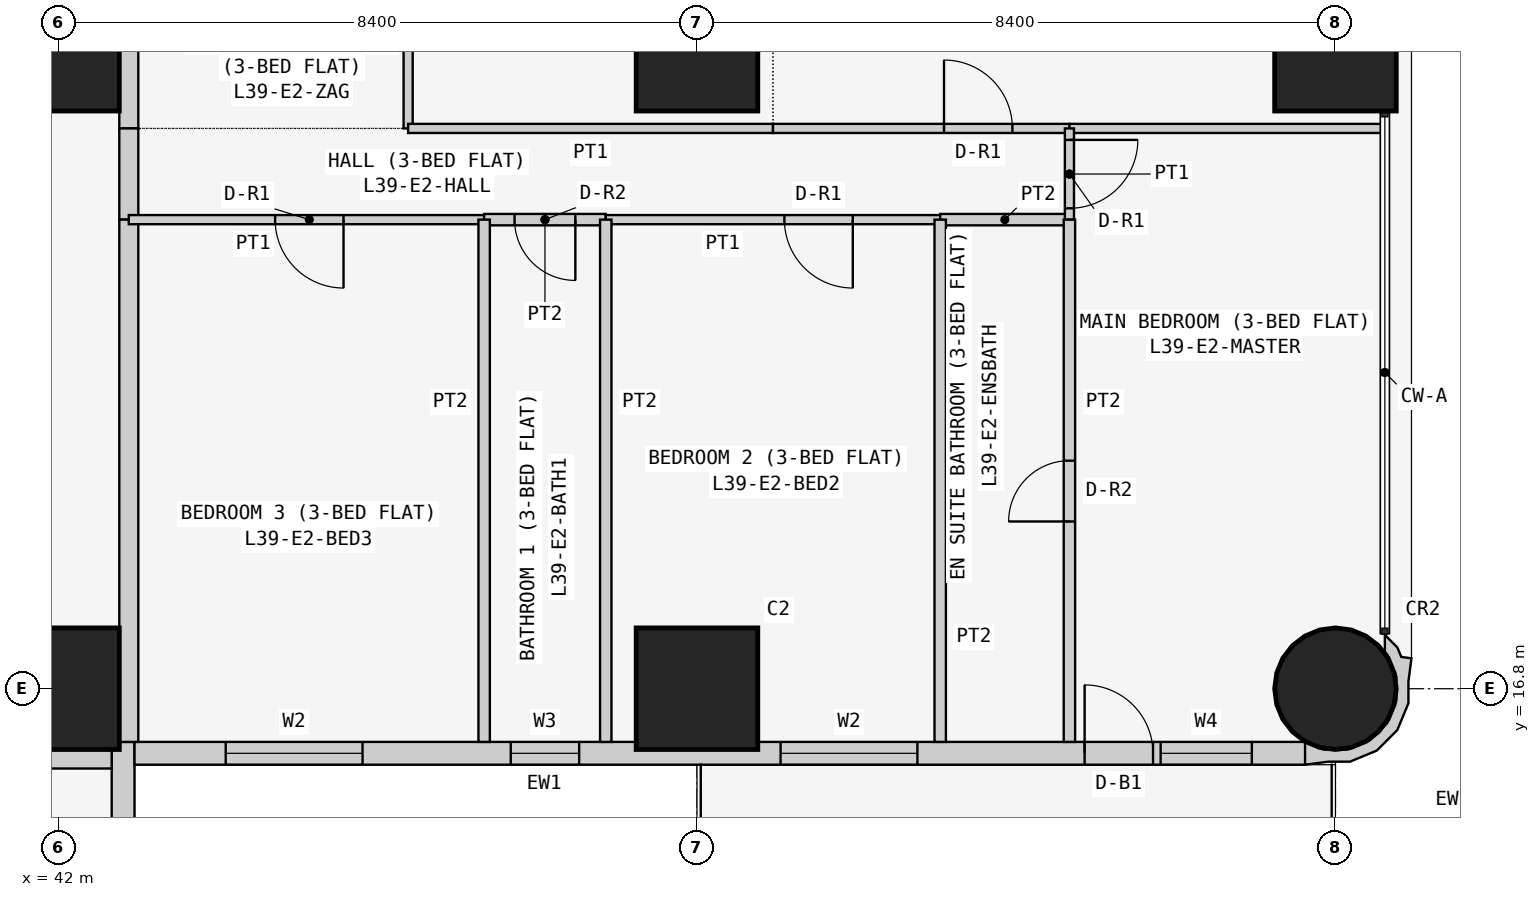
"""IFC4 building model, lengths in metres.
Left out: names, types, materials, properties, quantities, classifications, styles, units other than length and angle.
Written with IfcOpenShell. Run it as: python <this file> out.ifc"""

import sys

from ifc_helpers import new_model, si_unit, direction, frame, frame_2d, origin, origin_2d, place, context, subcontext, project, spatial, polyline, rectangle, circle, outline, extrude, element, fill, save


model = new_model("IFC4")
c1 = context("Model", 3, precision=1e-05, world=origin(), true_north=direction((0.0, 1.0)))
c2 = subcontext(c1, "Body", "Model", "MODEL_VIEW")
j1 = project(units=[si_unit("LENGTHUNIT", "METRE"), si_unit("PLANEANGLEUNIT", "RADIAN")], contexts=[c1])
p1 = place(None, origin())
s1 = spatial("IfcSite", under=j1, at=p1, CompositionType="ELEMENT")
p2 = place(p1, origin())
s2 = spatial("IfcBuilding", under=s1, at=p2, CompositionType="ELEMENT")
p3 = place(p2, frame((0.0, 0.0, 152.1)))
s3 = spatial("IfcBuildingStorey", under=s2, at=p3, CompositionType="ELEMENT", Elevation=152.1)
for number, where, z_axis, x_axis in (
    (1, (42.0, 16.8, 0.0), (0.0, 0.0, 1.0), (1.0, 0.0, 0.0)),
    (2, (42.0, 25.2, 0.0), (0.0, 0.0, 1.0), (1.0, 0.0, 0.0)),
    (3, (50.4, 16.8, 0.0), (0.0, 0.0, 1.0), (1.0, 0.0, 0.0)),
    (4, (50.4, 25.2, 0.0), (0.0, 0.0, 1.0), (1.0, 0.0, 0.0)),
):
    element("IfcColumn", number, at=place(p3, frame(where, z_axis=z_axis, x_axis=x_axis)), inside=s3, PredefinedType="COLUMN", context=c2, shape_type="SweptSolid", body=[
        extrude(rectangle(XDim=1.6, YDim=1.6, at=origin_2d()), origin(), (0.0, 0.0, 1.0), 3.6),
    ])
p4 = place(p3, frame((58.8, 16.8, 0.0), z_axis=(0.0, 0.0, 1.0), x_axis=(1.0, 0.0, 0.0)))
e5 = element("IfcColumn", 5, at=p4, inside=s3, PredefinedType="COLUMN", context=c2, shape_type="SweptSolid", body=[
    extrude(circle(Radius=0.8, at=origin_2d()), origin(), (0.0, 0.0, 1.0), 3.6),
])
p5 = place(p3, frame((58.8, 25.2, 0.0), z_axis=(0.0, 0.0, 1.0), x_axis=(1.0, 0.0, 0.0)))
e6 = element("IfcColumn", 6, at=p5, inside=s3, PredefinedType="COLUMN", context=c2, shape_type="SweptSolid", body=[
    extrude(rectangle(XDim=1.6, YDim=1.6, at=origin_2d()), origin(), (0.0, 0.0, 1.0), 3.6),
])
p6 = place(p3, frame((42.85, 8.8, 0.0), z_axis=(0.0, 0.0, 1.0), x_axis=(0.0, 1.0, 0.0)))
e7 = element("IfcWall", 7, at=p6, inside=s3, PredefinedType="SOLIDWALL", context=c2, shape_type="SweptSolid", body=[
    extrude(rectangle(XDim=7.3, YDim=0.3, at=frame_2d((3.65, 0.0))), origin(), (0.0, 0.0, 1.0), 3.45),
])
p7 = place(p6, frame((3.1, 0.0, 0.9)))
e8 = element("IfcOpeningElement", 8, at=p7, cuts=e7, PredefinedType="OPENING", context=c2, shape_type="SweptSolid", body=[
    extrude(rectangle(XDim=2.4, YDim=1.5, at=frame_2d((1.2, 0.75))), frame((0.0, 0.16, 0.0), z_axis=(0.0, -1.0, 0.0), x_axis=(1.0, 0.0, 0.0)), (0.0, 0.0, 1.0), 0.32),
])
p8 = place(p6, frame((0.75, 0.0, 0.9)))
e9 = element("IfcOpeningElement", 9, at=p8, cuts=e7, PredefinedType="OPENING", context=c2, shape_type="SweptSolid", body=[
    extrude(rectangle(XDim=1.2, YDim=1.5, at=frame_2d((0.6, 0.75))), frame((0.0, 0.16, 0.0), z_axis=(0.0, -1.0, 0.0), x_axis=(1.0, 0.0, 0.0)), (0.0, 0.0, 1.0), 0.32),
])
p9 = place(p3, frame((43.0, 15.95, 0.0), z_axis=(0.0, 0.0, 1.0), x_axis=(1.0, 0.0, 0.0)))
e10 = element("IfcWall", 10, at=p9, inside=s3, PredefinedType="SOLIDWALL", context=c2, shape_type="SweptSolid", body=[
    extrude(rectangle(XDim=15.4, YDim=0.3, at=frame_2d((7.7, 0.0))), origin(), (0.0, 0.0, 1.0), 3.45),
])
p10 = place(p9, frame((1.2, 0.0, 0.9)))
e11 = element("IfcOpeningElement", 11, at=p10, cuts=e10, PredefinedType="OPENING", context=c2, shape_type="SweptSolid", body=[
    extrude(rectangle(XDim=1.8, YDim=1.5, at=frame_2d((0.9, 0.75))), frame((0.0, 0.16, 0.0), z_axis=(0.0, -1.0, 0.0), x_axis=(1.0, 0.0, 0.0)), (0.0, 0.0, 1.0), 0.32),
])
p11 = place(p9, frame((4.95, 0.0, 1.5)))
e12 = element("IfcOpeningElement", 12, at=p11, cuts=e10, PredefinedType="OPENING", context=c2, shape_type="SweptSolid", body=[
    extrude(rectangle(XDim=0.9, YDim=0.7, at=frame_2d((0.45, 0.35))), frame((0.0, 0.16, 0.0), z_axis=(0.0, -1.0, 0.0), x_axis=(1.0, 0.0, 0.0)), (0.0, 0.0, 1.0), 0.32),
])
p12 = place(p9, frame((8.5, 0.0, 0.9)))
e13 = element("IfcOpeningElement", 13, at=p12, cuts=e10, PredefinedType="OPENING", context=c2, shape_type="SweptSolid", body=[
    extrude(rectangle(XDim=1.8, YDim=1.5, at=frame_2d((0.9, 0.75))), frame((0.0, 0.16, 0.0), z_axis=(0.0, -1.0, 0.0), x_axis=(1.0, 0.0, 0.0)), (0.0, 0.0, 1.0), 0.32),
])
p13 = place(p9, frame((12.5, 0.0, 0.0)))
e14 = element("IfcOpeningElement", 14, at=p13, cuts=e10, PredefinedType="OPENING", context=c2, shape_type="SweptSolid", body=[
    extrude(rectangle(XDim=0.9, YDim=2.4, at=frame_2d((0.45, 1.2))), frame((0.0, 0.16, 0.0), z_axis=(0.0, -1.0, 0.0), x_axis=(1.0, 0.0, 0.0)), (0.0, 0.0, 1.0), 0.32),
])
p14 = place(p9, frame((13.5, 0.0, 0.9)))
e15 = element("IfcOpeningElement", 15, at=p14, cuts=e10, PredefinedType="OPENING", context=c2, shape_type="SweptSolid", body=[
    extrude(rectangle(XDim=1.2, YDim=1.5, at=frame_2d((0.6, 0.75))), frame((0.0, 0.16, 0.0), z_axis=(0.0, -1.0, 0.0), x_axis=(1.0, 0.0, 0.0)), (0.0, 0.0, 1.0), 0.32),
])
p15 = place(p3, frame((58.473, 15.983, 0.0), z_axis=(0.0, 0.0, 1.0), x_axis=(0.93923434088, -0.343276641956, 0.0)))
e16 = element("IfcWall", 16, at=p15, inside=s3, PredefinedType="SOLIDWALL", context=c2, shape_type="SweptSolid", body=[
    extrude(outline(polyline([(0.828, 1.599), (0.697, 1.569), (0.604, 1.67), (0.394, 1.767), (0.471, 1.556), (0.508, 1.539), (0.724, 1.304), (0.834, 1.005), (0.82, 0.686), (0.686, 0.397), (0.451, 0.182), (0.152, 0.073), (-0.116, 0.084), (-0.127, 0.078), (-0.146, 0.071), (-0.006, -0.197), (0.266, -0.055), (0.535, 0.044), (0.817, 0.302), (0.978, 0.648), (0.994, 1.03), (0.895, 1.3), (0.828, 1.599)])), origin(), (0.0, 0.0, 1.0), 3.45),
])
p16 = place(p3, frame((42.925, 29.4, 0.0), z_axis=(0.0, 0.0, 1.0), x_axis=(0.0, -1.0, 0.0)))
e17 = element("IfcWall", 17, at=p16, inside=s3, PredefinedType="PARTITIONING", context=c2, shape_type="SweptSolid", body=[
    extrude(rectangle(XDim=5.229, YDim=0.25, at=frame_2d((2.615, 0.0))), origin(), (0.0, 0.0, 1.0), 3.45),
])
p17 = place(p16, frame((2.1, 0.0, 0.0)))
e18 = element("IfcOpeningElement", 18, at=p17, cuts=e17, PredefinedType="OPENING", context=c2, shape_type="SweptSolid", body=[
    extrude(rectangle(XDim=1.0, YDim=2.1, at=frame_2d((0.5, 1.05))), frame((0.0, 0.135, 0.0), z_axis=(0.0, -1.0, 0.0), x_axis=(1.0, 0.0, 0.0)), (0.0, 0.0, 1.0), 0.27),
])
p18 = place(p3, frame((42.925, 24.171, 0.0), z_axis=(0.0, 0.0, 1.0), x_axis=(0.0, -1.0, 0.0)))
e19 = element("IfcWall", 19, at=p18, inside=s3, PredefinedType="PARTITIONING", context=c2, shape_type="SweptSolid", body=[
    extrude(rectangle(XDim=1.2, YDim=0.25, at=frame_2d((0.6, 0.0))), origin(), (0.0, 0.0, 1.0), 3.45),
])
for number, where, z_axis, x_axis in (
    (20, (42.925, 22.971, 0.0), (0.0, 0.0, 1.0), (0.0, -1.0, 0.0)),
    (21, (42.7, 15.875, 0.0), (0.0, 0.0, 1.0), (-1.0, 0.0, 0.0)),
):
    element("IfcWall", number, at=place(p3, frame(where, z_axis=z_axis, x_axis=x_axis)), inside=s3, PredefinedType="PARTITIONING", context=c2, shape_type="SweptSolid", body=[
        extrude(rectangle(XDim=6.871, YDim=0.25, at=frame_2d((3.436, 0.0))), origin(), (0.0, 0.0, 1.0), 3.45),
    ])
p19 = place(p3, frame((46.6, 29.4, 0.0), z_axis=(0.0, 0.0, 1.0), x_axis=(0.0, -1.0, 0.0)))
e22 = element("IfcWall", 22, at=p19, inside=s3, PredefinedType="PARTITIONING", context=c2, shape_type="SweptSolid", body=[
    extrude(rectangle(XDim=5.229, YDim=0.12, at=frame_2d((2.615, 0.0))), origin(), (0.0, 0.0, 1.0), 3.45),
])
p20 = place(p19, frame((1.05, 0.0, 0.0)))
e23 = element("IfcOpeningElement", 23, at=p20, cuts=e22, PredefinedType="OPENING", context=c2, shape_type="SweptSolid", body=[
    extrude(rectangle(XDim=0.9, YDim=2.1, at=frame_2d((0.45, 1.05))), frame((0.0, 0.07, 0.0), z_axis=(0.0, -1.0, 0.0), x_axis=(1.0, 0.0, 0.0)), (0.0, 0.0, 1.0), 0.14),
])
p21 = place(p3, frame((51.4, 24.171, 0.0), z_axis=(0.0, 0.0, 1.0), x_axis=(-1.0, 0.0, 0.0)))
e24 = element("IfcWall", 24, at=p21, inside=s3, PredefinedType="PARTITIONING", context=c2, shape_type="SweptSolid", body=[
    extrude(rectangle(XDim=4.8, YDim=0.12, at=frame_2d((2.4, 0.0))), origin(), (0.0, 0.0, 1.0), 3.45),
])
p22 = place(p3, frame((55.3, 24.171, 0.0), z_axis=(0.0, 0.0, 1.0), x_axis=(-1.0, 0.0, 0.0)))
e25 = element("IfcWall", 25, at=p22, inside=s3, PredefinedType="PARTITIONING", context=c2, shape_type="SweptSolid", body=[
    extrude(rectangle(XDim=3.9, YDim=0.12, at=frame_2d((1.95, 0.0))), origin(), (0.0, 0.0, 1.0), 3.45),
])
p23 = place(p22, frame((0.75, 0.0, 0.0)))
e26 = element("IfcOpeningElement", 26, at=p23, cuts=e25, PredefinedType="OPENING", context=c2, shape_type="SweptSolid", body=[
    extrude(rectangle(XDim=0.9, YDim=2.1, at=frame_2d((0.45, 1.05))), frame((0.0, 0.07, 0.0), z_axis=(0.0, -1.0, 0.0), x_axis=(1.0, 0.0, 0.0)), (0.0, 0.0, 1.0), 0.14),
])
p24 = place(p3, frame((59.45, 24.171, 0.0), z_axis=(0.0, 0.0, 1.0), x_axis=(-1.0, 0.0, 0.0)))
e27 = element("IfcWall", 27, at=p24, inside=s3, PredefinedType="PARTITIONING", context=c2, shape_type="SweptSolid", body=[
    extrude(rectangle(XDim=4.15, YDim=0.12, at=frame_2d((2.075, 0.0))), origin(), (0.0, 0.0, 1.0), 3.45),
])
p25 = place(p3, frame((47.6, 22.971, 0.0), z_axis=(0.0, 0.0, 1.0), x_axis=(-1.0, 0.0, 0.0)))
e28 = element("IfcWall", 28, at=p25, inside=s3, PredefinedType="PARTITIONING", context=c2, shape_type="SweptSolid", body=[
    extrude(rectangle(XDim=4.675, YDim=0.12, at=frame_2d((2.337, 0.0))), origin(), (0.0, 0.0, 1.0), 3.45),
])
p26 = place(p25, frame((1.85, 0.0, 0.0)))
e29 = element("IfcOpeningElement", 29, at=p26, cuts=e28, PredefinedType="OPENING", context=c2, shape_type="SweptSolid", body=[
    extrude(rectangle(XDim=0.9, YDim=2.1, at=frame_2d((0.45, 1.05))), frame((0.0, 0.07, 0.0), z_axis=(0.0, -1.0, 0.0), x_axis=(1.0, 0.0, 0.0)), (0.0, 0.0, 1.0), 0.14),
])
p27 = place(p3, frame((49.2, 22.971, 0.0), z_axis=(0.0, 0.0, 1.0), x_axis=(-1.0, 0.0, 0.0)))
e30 = element("IfcWall", 30, at=p27, inside=s3, PredefinedType="PARTITIONING", context=c2, shape_type="SweptSolid", body=[
    extrude(rectangle(XDim=1.6, YDim=0.15, at=frame_2d((0.8, 0.0))), origin(), (0.0, 0.0, 1.0), 3.45),
])
p28 = place(p27, frame((0.4, 0.0, 0.0)))
e31 = element("IfcOpeningElement", 31, at=p28, cuts=e30, PredefinedType="OPENING", context=c2, shape_type="SweptSolid", body=[
    extrude(rectangle(XDim=0.8, YDim=2.1, at=frame_2d((0.4, 1.05))), frame((0.0, 0.085, 0.0), z_axis=(0.0, -1.0, 0.0), x_axis=(1.0, 0.0, 0.0)), (0.0, 0.0, 1.0), 0.17),
])
p29 = place(p3, frame((53.6, 22.971, 0.0), z_axis=(0.0, 0.0, 1.0), x_axis=(-1.0, 0.0, 0.0)))
e32 = element("IfcWall", 32, at=p29, inside=s3, PredefinedType="PARTITIONING", context=c2, shape_type="SweptSolid", body=[
    extrude(rectangle(XDim=4.4, YDim=0.12, at=frame_2d((2.2, 0.0))), origin(), (0.0, 0.0, 1.0), 3.45),
])
p30 = place(p29, frame((1.15, 0.0, 0.0)))
e33 = element("IfcOpeningElement", 33, at=p30, cuts=e32, PredefinedType="OPENING", context=c2, shape_type="SweptSolid", body=[
    extrude(rectangle(XDim=0.9, YDim=2.1, at=frame_2d((0.45, 1.05))), frame((0.0, 0.07, 0.0), z_axis=(0.0, -1.0, 0.0), x_axis=(1.0, 0.0, 0.0)), (0.0, 0.0, 1.0), 0.14),
])
p31 = place(p3, frame((55.3, 22.971, 0.0), z_axis=(0.0, 0.0, 1.0), x_axis=(-1.0, 0.0, 0.0)))
e34 = element("IfcWall", 34, at=p31, inside=s3, PredefinedType="PARTITIONING", context=c2, shape_type="SweptSolid", body=[
    extrude(rectangle(XDim=1.7, YDim=0.15, at=frame_2d((0.85, 0.0))), origin(), (0.0, 0.0, 1.0), 3.45),
])
p32 = place(p3, frame((55.3, 24.171, 0.0), z_axis=(0.0, 0.0, 1.0), x_axis=(0.0, -1.0, 0.0)))
e35 = element("IfcWall", 35, at=p32, inside=s3, PredefinedType="PARTITIONING", context=c2, shape_type="SweptSolid", body=[
    extrude(rectangle(XDim=1.2, YDim=0.12, at=frame_2d((0.6, 0.0))), origin(), (0.0, 0.0, 1.0), 3.45),
])
p33 = place(p32, frame((0.151, 0.0, 0.0)))
e36 = element("IfcOpeningElement", 36, at=p33, cuts=e35, PredefinedType="OPENING", context=c2, shape_type="SweptSolid", body=[
    extrude(rectangle(XDim=0.9, YDim=2.1, at=frame_2d((0.45, 1.05))), frame((0.0, 0.07, 0.0), z_axis=(0.0, -1.0, 0.0), x_axis=(1.0, 0.0, 0.0)), (0.0, 0.0, 1.0), 0.14),
])
for number, where, z_axis, x_axis in (
    (37, (47.6, 22.971, 0.0), (0.0, 0.0, 1.0), (0.0, -1.0, 0.0)),
    (38, (49.2, 22.971, 0.0), (0.0, 0.0, 1.0), (0.0, -1.0, 0.0)),
    (39, (53.6, 22.971, 0.0), (0.0, 0.0, 1.0), (0.0, -1.0, 0.0)),
):
    element("IfcWall", number, at=place(p3, frame(where, z_axis=z_axis, x_axis=x_axis)), inside=s3, PredefinedType="PARTITIONING", context=c2, shape_type="SweptSolid", body=[
        extrude(rectangle(XDim=6.871, YDim=0.15, at=frame_2d((3.436, 0.0))), origin(), (0.0, 0.0, 1.0), 3.45),
    ])
p34 = place(p3, frame((55.3, 22.971, 0.0), z_axis=(0.0, 0.0, 1.0), x_axis=(0.0, -1.0, 0.0)))
e40 = element("IfcWall", 40, at=p34, inside=s3, PredefinedType="PARTITIONING", context=c2, shape_type="SweptSolid", body=[
    extrude(rectangle(XDim=6.871, YDim=0.15, at=frame_2d((3.436, 0.0))), origin(), (0.0, 0.0, 1.0), 3.45),
])
p35 = place(p34, frame((3.171, 0.0, 0.0)))
e41 = element("IfcOpeningElement", 41, at=p35, cuts=e40, PredefinedType="OPENING", context=c2, shape_type="SweptSolid", body=[
    extrude(rectangle(XDim=0.8, YDim=2.1, at=frame_2d((0.4, 1.05))), frame((0.0, 0.085, 0.0), z_axis=(0.0, -1.0, 0.0), x_axis=(1.0, 0.0, 0.0)), (0.0, 0.0, 1.0), 0.17),
])
p36 = place(p10, origin())
e42 = element("IfcWindow", 42, at=p36, inside=s3, PartitioningType="SINGLE_PANEL", PredefinedType="WINDOW", context=c2, shape_type="SweptSolid", body=[
    extrude(rectangle(XDim=1.8, YDim=1.5, at=frame_2d((0.9, 0.75))), frame((0.0, 0.03, 0.0), z_axis=(0.0, -1.0, 0.0), x_axis=(1.0, 0.0, 0.0)), (0.0, 0.0, 1.0), 0.06),
])
fill(e11, e42)
p37 = place(p11, origin())
e43 = element("IfcWindow", 43, at=p37, inside=s3, PartitioningType="SINGLE_PANEL", PredefinedType="WINDOW", context=c2, shape_type="SweptSolid", body=[
    extrude(rectangle(XDim=0.9, YDim=0.7, at=frame_2d((0.45, 0.35))), frame((0.0, 0.03, 0.0), z_axis=(0.0, -1.0, 0.0), x_axis=(1.0, 0.0, 0.0)), (0.0, 0.0, 1.0), 0.06),
])
fill(e12, e43)
p38 = place(p12, origin())
e44 = element("IfcWindow", 44, at=p38, inside=s3, PartitioningType="SINGLE_PANEL", PredefinedType="WINDOW", context=c2, shape_type="SweptSolid", body=[
    extrude(rectangle(XDim=1.8, YDim=1.5, at=frame_2d((0.9, 0.75))), frame((0.0, 0.03, 0.0), z_axis=(0.0, -1.0, 0.0), x_axis=(1.0, 0.0, 0.0)), (0.0, 0.0, 1.0), 0.06),
])
fill(e13, e44)
p39 = place(p13, origin())
e45 = element("IfcDoor", 45, at=p39, inside=s3, OperationType="SINGLE_SWING_LEFT", PredefinedType="DOOR", context=c2, shape_type="SweptSolid", body=[
    extrude(rectangle(XDim=0.9, YDim=2.4, at=frame_2d((0.45, 1.2))), frame((0.0, 0.025, 0.0), z_axis=(0.0, -1.0, 0.0), x_axis=(1.0, 0.0, 0.0)), (0.0, 0.0, 1.0), 0.05),
])
fill(e14, e45)
p40 = place(p14, origin())
e46 = element("IfcWindow", 46, at=p40, inside=s3, PartitioningType="SINGLE_PANEL", PredefinedType="WINDOW", context=c2, shape_type="SweptSolid", body=[
    extrude(rectangle(XDim=1.2, YDim=1.5, at=frame_2d((0.6, 0.75))), frame((0.0, 0.03, 0.0), z_axis=(0.0, -1.0, 0.0), x_axis=(1.0, 0.0, 0.0)), (0.0, 0.0, 1.0), 0.06),
])
fill(e15, e46)
p41 = place(p23, frame((0.9, 0.0, 0.0), z_axis=(0.0, 0.0, 1.0), x_axis=(-1.0, 0.0, 0.0)))
e47 = element("IfcDoor", 47, at=p41, inside=s3, OperationType="SINGLE_SWING_LEFT", PredefinedType="DOOR", context=c2, shape_type="SweptSolid", body=[
    extrude(rectangle(XDim=0.9, YDim=2.1, at=frame_2d((0.45, 1.05))), frame((0.0, 0.025, 0.0), z_axis=(0.0, -1.0, 0.0), x_axis=(1.0, 0.0, 0.0)), (0.0, 0.0, 1.0), 0.05),
])
fill(e26, e47)
p42 = place(p26, origin())
e48 = element("IfcDoor", 48, at=p42, inside=s3, OperationType="SINGLE_SWING_LEFT", PredefinedType="DOOR", context=c2, shape_type="SweptSolid", body=[
    extrude(rectangle(XDim=0.9, YDim=2.1, at=frame_2d((0.45, 1.05))), frame((0.0, 0.025, 0.0), z_axis=(0.0, -1.0, 0.0), x_axis=(1.0, 0.0, 0.0)), (0.0, 0.0, 1.0), 0.05),
])
fill(e29, e48)
p43 = place(p28, origin())
e49 = element("IfcDoor", 49, at=p43, inside=s3, OperationType="SINGLE_SWING_LEFT", PredefinedType="DOOR", context=c2, shape_type="SweptSolid", body=[
    extrude(rectangle(XDim=0.8, YDim=2.1, at=frame_2d((0.4, 1.05))), frame((0.0, 0.025, 0.0), z_axis=(0.0, -1.0, 0.0), x_axis=(1.0, 0.0, 0.0)), (0.0, 0.0, 1.0), 0.05),
])
fill(e31, e49)
p44 = place(p30, origin())
e50 = element("IfcDoor", 50, at=p44, inside=s3, OperationType="SINGLE_SWING_LEFT", PredefinedType="DOOR", context=c2, shape_type="SweptSolid", body=[
    extrude(rectangle(XDim=0.9, YDim=2.1, at=frame_2d((0.45, 1.05))), frame((0.0, 0.025, 0.0), z_axis=(0.0, -1.0, 0.0), x_axis=(1.0, 0.0, 0.0)), (0.0, 0.0, 1.0), 0.05),
])
fill(e33, e50)
p45 = place(p33, origin())
e51 = element("IfcDoor", 51, at=p45, inside=s3, OperationType="SINGLE_SWING_LEFT", PredefinedType="DOOR", context=c2, shape_type="SweptSolid", body=[
    extrude(rectangle(XDim=0.9, YDim=2.1, at=frame_2d((0.45, 1.05))), frame((0.0, 0.025, 0.0), z_axis=(0.0, -1.0, 0.0), x_axis=(1.0, 0.0, 0.0)), (0.0, 0.0, 1.0), 0.05),
])
fill(e36, e51)
p46 = place(p35, frame((0.8, 0.0, 0.0), z_axis=(0.0, 0.0, 1.0), x_axis=(-1.0, 0.0, 0.0)))
e52 = element("IfcDoor", 52, at=p46, inside=s3, OperationType="SINGLE_SWING_LEFT", PredefinedType="DOOR", context=c2, shape_type="SweptSolid", body=[
    extrude(rectangle(XDim=0.8, YDim=2.1, at=frame_2d((0.4, 1.05))), frame((0.0, 0.025, 0.0), z_axis=(0.0, -1.0, 0.0), x_axis=(1.0, 0.0, 0.0)), (0.0, 0.0, 1.0), 0.05),
])
fill(e41, e52)
save(model, sys.argv[1])
